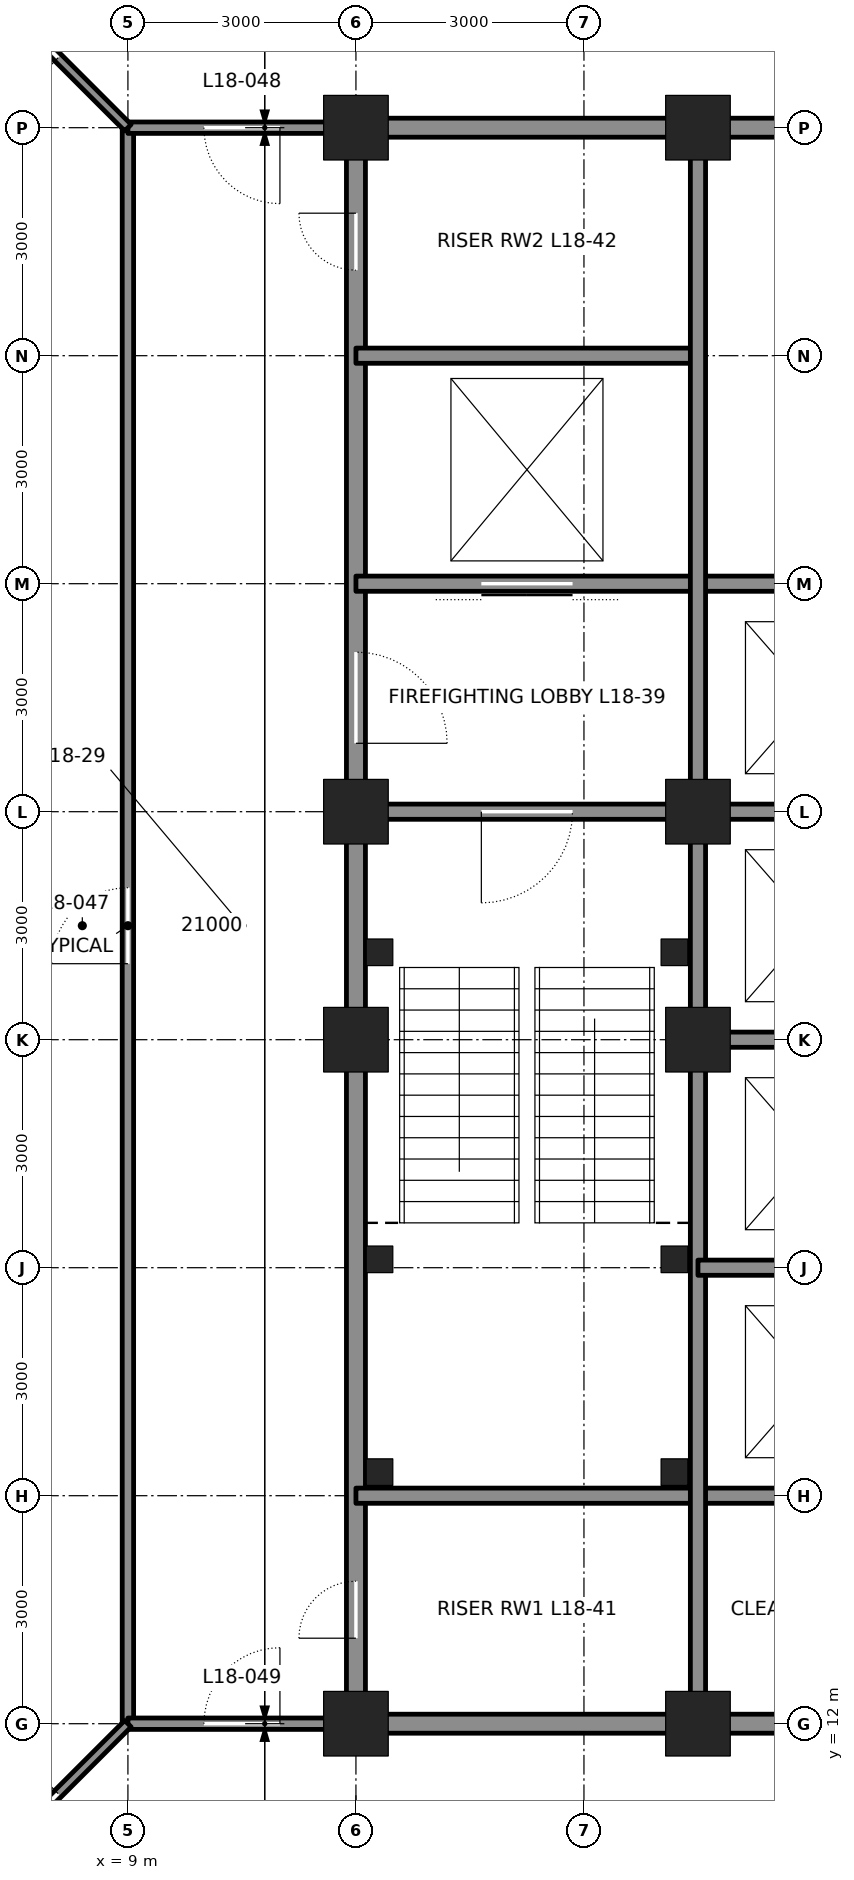
"""IFC4 building model, lengths in metres.
Left out: names, types, materials, properties, quantities, classifications, styles, units other than length and angle.
Written with IfcOpenShell. Run it as: python <this file> out.ifc"""

import sys

from ifc_helpers import new_model, si_unit, direction, frame, frame_2d, origin, origin_2d, place, context, subcontext, project, spatial, rectangle, hollow_rectangle, extrude, element, fill, save


model = new_model("IFC4")
c1 = context("Model", 3, precision=1e-05, world=origin(), true_north=direction((0.0, 1.0)))
c2 = subcontext(c1, "Body", "Model", "MODEL_VIEW")
j1 = project(units=[si_unit("LENGTHUNIT", "METRE"), si_unit("PLANEANGLEUNIT", "RADIAN")], contexts=[c1])
p1 = place(None, origin())
s1 = spatial("IfcSite", under=j1, at=p1, CompositionType="ELEMENT")
p2 = place(p1, origin())
s2 = spatial("IfcBuilding", under=s1, at=p2, CompositionType="ELEMENT")
p3 = place(p2, frame((0.0, 0.0, 87.3)))
s3 = spatial("IfcBuildingStorey", under=s2, at=p3, CompositionType="ELEMENT", Elevation=87.3)
for number, where, z_axis, x_axis in (
    (1, (12.0, 12.0, 0.0), (0.0, 0.0, 1.0), (1.0, 0.0, 0.0)),
    (2, (16.5, 12.0, 0.0), (0.0, 0.0, 1.0), (1.0, 0.0, 0.0)),
    (3, (12.0, 33.0, 0.0), (0.0, 0.0, 1.0), (1.0, 0.0, 0.0)),
    (4, (16.5, 33.0, 0.0), (0.0, 0.0, 1.0), (1.0, 0.0, 0.0)),
    (5, (12.0, 21.0, 0.0), (0.0, 0.0, 1.0), (1.0, 0.0, 0.0)),
    (6, (12.0, 24.0, 0.0), (0.0, 0.0, 1.0), (1.0, 0.0, 0.0)),
    (7, (16.5, 21.0, 0.0), (0.0, 0.0, 1.0), (1.0, 0.0, 0.0)),
    (8, (16.5, 24.0, 0.0), (0.0, 0.0, 1.0), (1.0, 0.0, 0.0)),
):
    element("IfcColumn", number, at=place(p3, frame(where, z_axis=z_axis, x_axis=x_axis)), inside=s3, PredefinedType="COLUMN", context=c2, shape_type="SweptSolid", body=[
        extrude(hollow_rectangle(XDim=0.85, YDim=0.85, WallThickness=0.085, at=origin_2d()), origin(), (0.0, 0.0, 1.0), 4.5),
    ])
p4 = place(p3, frame((12.0, 12.25, 0.0), z_axis=(0.0, 0.0, 1.0), x_axis=(0.0, 1.0, 0.0)))
e9 = element("IfcWall", 9, at=p4, inside=s3, PredefinedType="SOLIDWALL", context=c2, shape_type="SweptSolid", body=[
    extrude(rectangle(XDim=8.5, YDim=0.25, at=frame_2d((4.25, 0.0))), origin(), (0.0, 0.0, 1.0), 3.113),
])
p5 = place(p4, frame((0.875, 0.0, 0.0)))
e10 = element("IfcOpeningElement", 10, at=p5, cuts=e9, PredefinedType="OPENING", context=c2, shape_type="SweptSolid", body=[
    extrude(rectangle(XDim=0.75, YDim=2.1, at=frame_2d((0.375, 1.05))), frame((0.0, 0.135, 0.0), z_axis=(0.0, -1.0, 0.0), x_axis=(1.0, 0.0, 0.0)), (0.0, 0.0, 1.0), 0.27),
])
p6 = place(p3, frame((12.0, 21.25, 0.0), z_axis=(0.0, 0.0, 1.0), x_axis=(0.0, 1.0, 0.0)))
e11 = element("IfcWall", 11, at=p6, inside=s3, PredefinedType="SOLIDWALL", context=c2, shape_type="SweptSolid", body=[
    extrude(rectangle(XDim=2.5, YDim=0.25, at=frame_2d((1.25, 0.0))), origin(), (0.0, 0.0, 1.0), 3.113),
])
p7 = place(p3, frame((12.0, 24.25, 0.0), z_axis=(0.0, 0.0, 1.0), x_axis=(0.0, 1.0, 0.0)))
e12 = element("IfcWall", 12, at=p7, inside=s3, PredefinedType="SOLIDWALL", context=c2, shape_type="SweptSolid", body=[
    extrude(rectangle(XDim=8.5, YDim=0.25, at=frame_2d((4.25, 0.0))), origin(), (0.0, 0.0, 1.0), 3.113),
])
p8 = place(p7, frame((0.65, 0.0, 0.0)))
e13 = element("IfcOpeningElement", 13, at=p8, cuts=e12, PredefinedType="OPENING", context=c2, shape_type="SweptSolid", body=[
    extrude(rectangle(XDim=1.2, YDim=2.1, at=frame_2d((0.6, 1.05))), frame((0.0, 0.135, 0.0), z_axis=(0.0, -1.0, 0.0), x_axis=(1.0, 0.0, 0.0)), (0.0, 0.0, 1.0), 0.27),
])
p9 = place(p7, frame((6.875, 0.0, 0.0)))
e14 = element("IfcOpeningElement", 14, at=p9, cuts=e12, PredefinedType="OPENING", context=c2, shape_type="SweptSolid", body=[
    extrude(rectangle(XDim=0.75, YDim=2.1, at=frame_2d((0.375, 1.05))), frame((0.0, 0.135, 0.0), z_axis=(0.0, -1.0, 0.0), x_axis=(1.0, 0.0, 0.0)), (0.0, 0.0, 1.0), 0.27),
])
p10 = place(p3, frame((12.25, 12.0, 0.0), z_axis=(0.0, 0.0, 1.0), x_axis=(1.0, 0.0, 0.0)))
e15 = element("IfcWall", 15, at=p10, inside=s3, PredefinedType="SOLIDWALL", context=c2, shape_type="SweptSolid", body=[
    extrude(rectangle(XDim=4.0, YDim=0.25, at=frame_2d((2.0, 0.0))), origin(), (0.0, 0.0, 1.0), 3.181),
])
p11 = place(p3, frame((16.75, 12.0, 0.0), z_axis=(0.0, 0.0, 1.0), x_axis=(1.0, 0.0, 0.0)))
e16 = element("IfcWall", 16, at=p11, inside=s3, PredefinedType="SOLIDWALL", context=c2, shape_type="SweptSolid", body=[
    extrude(rectangle(XDim=2.5, YDim=0.25, at=frame_2d((1.25, 0.0))), origin(), (0.0, 0.0, 1.0), 3.181),
])
p12 = place(p3, frame((12.0, 15.0, 0.0), z_axis=(0.0, 0.0, 1.0), x_axis=(1.0, 0.0, 0.0)))
e17 = element("IfcWall", 17, at=p12, inside=s3, PredefinedType="SOLIDWALL", context=c2, shape_type="SweptSolid", body=[
    extrude(rectangle(XDim=7.5, YDim=0.2, at=frame_2d((3.75, 0.0))), origin(), (0.0, 0.0, 1.0), 4.34),
])
p13 = place(p3, frame((12.25, 24.0, 0.0), z_axis=(0.0, 0.0, 1.0), x_axis=(1.0, 0.0, 0.0)))
e18 = element("IfcWall", 18, at=p13, inside=s3, PredefinedType="SOLIDWALL", context=c2, shape_type="SweptSolid", body=[
    extrude(rectangle(XDim=4.0, YDim=0.2, at=frame_2d((2.0, 0.0))), origin(), (0.0, 0.0, 1.0), 3.39),
])
p14 = place(p13, frame((1.4, 0.0, 0.0)))
e19 = element("IfcOpeningElement", 19, at=p14, cuts=e18, PredefinedType="OPENING", context=c2, shape_type="SweptSolid", body=[
    extrude(rectangle(XDim=1.2, YDim=2.1, at=frame_2d((0.6, 1.05))), frame((0.0, 0.11, 0.0), z_axis=(0.0, -1.0, 0.0), x_axis=(1.0, 0.0, 0.0)), (0.0, 0.0, 1.0), 0.22),
])
p15 = place(p3, frame((16.75, 24.0, 0.0), z_axis=(0.0, 0.0, 1.0), x_axis=(1.0, 0.0, 0.0)))
e20 = element("IfcWall", 20, at=p15, inside=s3, PredefinedType="SOLIDWALL", context=c2, shape_type="SweptSolid", body=[
    extrude(rectangle(XDim=2.75, YDim=0.2, at=frame_2d((1.375, 0.0))), origin(), (0.0, 0.0, 1.0), 3.39),
])
p16 = place(p3, frame((12.0, 27.0, 0.0), z_axis=(0.0, 0.0, 1.0), x_axis=(1.0, 0.0, 0.0)))
e21 = element("IfcWall", 21, at=p16, inside=s3, PredefinedType="SOLIDWALL", context=c2, shape_type="SweptSolid", body=[
    extrude(rectangle(XDim=7.5, YDim=0.2, at=frame_2d((3.75, 0.0))), origin(), (0.0, 0.0, 1.0), 4.34),
])
p17 = place(p16, frame((1.65, 0.0, 0.0)))
e22 = element("IfcOpeningElement", 22, at=p17, cuts=e21, PredefinedType="OPENING", context=c2, shape_type="SweptSolid", body=[
    extrude(rectangle(XDim=1.2, YDim=2.1, at=frame_2d((0.6, 1.05))), frame((0.0, 0.11, 0.0), z_axis=(0.0, -1.0, 0.0), x_axis=(1.0, 0.0, 0.0)), (0.0, 0.0, 1.0), 0.22),
])
p18 = place(p3, frame((12.0, 30.0, 0.0), z_axis=(0.0, 0.0, 1.0), x_axis=(1.0, 0.0, 0.0)))
e23 = element("IfcWall", 23, at=p18, inside=s3, PredefinedType="SOLIDWALL", context=c2, shape_type="SweptSolid", body=[
    extrude(rectangle(XDim=4.5, YDim=0.2, at=frame_2d((2.25, 0.0))), origin(), (0.0, 0.0, 1.0), 4.34),
])
p19 = place(p3, frame((12.25, 33.0, 0.0), z_axis=(0.0, 0.0, 1.0), x_axis=(1.0, 0.0, 0.0)))
e24 = element("IfcWall", 24, at=p19, inside=s3, PredefinedType="SOLIDWALL", context=c2, shape_type="SweptSolid", body=[
    extrude(rectangle(XDim=4.0, YDim=0.25, at=frame_2d((2.0, 0.0))), origin(), (0.0, 0.0, 1.0), 3.181),
])
p20 = place(p3, frame((16.75, 33.0, 0.0), z_axis=(0.0, 0.0, 1.0), x_axis=(1.0, 0.0, 0.0)))
e25 = element("IfcWall", 25, at=p20, inside=s3, PredefinedType="SOLIDWALL", context=c2, shape_type="SweptSolid", body=[
    extrude(rectangle(XDim=2.5, YDim=0.25, at=frame_2d((1.25, 0.0))), origin(), (0.0, 0.0, 1.0), 3.181),
])
p21 = place(p3, frame((16.5, 12.25, 0.0), z_axis=(0.0, 0.0, 1.0), x_axis=(0.0, 1.0, 0.0)))
e26 = element("IfcWall", 26, at=p21, inside=s3, PredefinedType="SOLIDWALL", context=c2, shape_type="SweptSolid", body=[
    extrude(rectangle(XDim=8.5, YDim=0.2, at=frame_2d((4.25, 0.0))), origin(), (0.0, 0.0, 1.0), 3.413),
])
p22 = place(p3, frame((16.5, 21.25, 0.0), z_axis=(0.0, 0.0, 1.0), x_axis=(0.0, 1.0, 0.0)))
e27 = element("IfcWall", 27, at=p22, inside=s3, PredefinedType="SOLIDWALL", context=c2, shape_type="SweptSolid", body=[
    extrude(rectangle(XDim=2.5, YDim=0.2, at=frame_2d((1.25, 0.0))), origin(), (0.0, 0.0, 1.0), 3.413),
])
p23 = place(p3, frame((16.5, 24.25, 0.0), z_axis=(0.0, 0.0, 1.0), x_axis=(0.0, 1.0, 0.0)))
e28 = element("IfcWall", 28, at=p23, inside=s3, PredefinedType="SOLIDWALL", context=c2, shape_type="SweptSolid", body=[
    extrude(rectangle(XDim=8.5, YDim=0.2, at=frame_2d((4.25, 0.0))), origin(), (0.0, 0.0, 1.0), 3.413),
])
p24 = place(p3, frame((16.5, 18.0, 0.0), z_axis=(0.0, 0.0, 1.0), x_axis=(1.0, 0.0, 0.0)))
e29 = element("IfcWall", 29, at=p24, inside=s3, PredefinedType="SOLIDWALL", context=c2, shape_type="SweptSolid", body=[
    extrude(rectangle(XDim=3.0, YDim=0.2, at=frame_2d((1.5, 0.0))), origin(), (0.0, 0.0, 1.0), 4.34),
])
p25 = place(p3, frame((16.75, 21.0, 0.0), z_axis=(0.0, 0.0, 1.0), x_axis=(1.0, 0.0, 0.0)))
e30 = element("IfcWall", 30, at=p25, inside=s3, PredefinedType="SOLIDWALL", context=c2, shape_type="SweptSolid", body=[
    extrude(rectangle(XDim=2.75, YDim=0.2, at=frame_2d((1.375, 0.0))), origin(), (0.0, 0.0, 1.0), 3.39),
])
p26 = place(p3, frame((9.0, 12.0, -0.3), z_axis=(0.0, 0.0, 1.0), x_axis=(0.0, 1.0, 0.0)))
e31 = element("IfcWall", 31, at=p26, inside=s3, PredefinedType="PARTITIONING", context=c2, shape_type="SweptSolid", body=[
    extrude(rectangle(XDim=21.0, YDim=0.15, at=frame_2d((10.5, 0.0))), origin(), (0.0, 0.0, 1.0), 4.34),
])
p27 = place(p26, frame((10.0, 0.0, 0.3)))
e32 = element("IfcOpeningElement", 32, at=p27, cuts=e31, PredefinedType="OPENING", context=c2, shape_type="SweptSolid", body=[
    extrude(rectangle(XDim=1.0, YDim=2.4, at=frame_2d((0.5, 1.2))), frame((0.0, 0.085, 0.0), z_axis=(0.0, -1.0, 0.0), x_axis=(1.0, 0.0, 0.0)), (0.0, 0.0, 1.0), 0.17),
])
p28 = place(p3, frame((9.0, 33.0, -0.3), z_axis=(0.0, 0.0, 1.0), x_axis=(1.0, 0.0, 0.0)))
e33 = element("IfcWall", 33, at=p28, inside=s3, PredefinedType="PARTITIONING", context=c2, shape_type="SweptSolid", body=[
    extrude(rectangle(XDim=3.0, YDim=0.15, at=frame_2d((1.5, 0.0))), origin(), (0.0, 0.0, 1.0), 3.481),
])
p29 = place(p28, frame((1.0, 0.0, 0.3)))
e34 = element("IfcOpeningElement", 34, at=p29, cuts=e33, PredefinedType="OPENING", context=c2, shape_type="SweptSolid", body=[
    extrude(rectangle(XDim=1.0, YDim=2.4, at=frame_2d((0.5, 1.2))), frame((0.0, 0.085, 0.0), z_axis=(0.0, -1.0, 0.0), x_axis=(1.0, 0.0, 0.0)), (0.0, 0.0, 1.0), 0.17),
])
p30 = place(p3, frame((9.0, 12.0, -0.3), z_axis=(0.0, 0.0, 1.0), x_axis=(1.0, 0.0, 0.0)))
e35 = element("IfcWall", 35, at=p30, inside=s3, PredefinedType="PARTITIONING", context=c2, shape_type="SweptSolid", body=[
    extrude(rectangle(XDim=3.0, YDim=0.15, at=frame_2d((1.5, 0.0))), origin(), (0.0, 0.0, 1.0), 3.481),
])
p31 = place(p30, frame((1.0, 0.0, 0.3)))
e36 = element("IfcOpeningElement", 36, at=p31, cuts=e35, PredefinedType="OPENING", context=c2, shape_type="SweptSolid", body=[
    extrude(rectangle(XDim=1.0, YDim=2.4, at=frame_2d((0.5, 1.2))), frame((0.0, 0.085, 0.0), z_axis=(0.0, -1.0, 0.0), x_axis=(1.0, 0.0, 0.0)), (0.0, 0.0, 1.0), 0.17),
])
p32 = place(p3, frame((9.0, 33.0, -0.3), z_axis=(0.0, 0.0, 1.0), x_axis=(-0.707106781187, 0.707106781187, 0.0)))
e37 = element("IfcWall", 37, at=p32, inside=s3, PredefinedType="PARTITIONING", context=c2, shape_type="SweptSolid", body=[
    extrude(rectangle(XDim=11.842, YDim=0.12, at=frame_2d((5.921, 0.0))), origin(), (0.0, 0.0, 1.0), 4.34),
])
p33 = place(p32, frame((1.3, 0.0, 0.3)))
e38 = element("IfcOpeningElement", 38, at=p33, cuts=e37, PredefinedType="OPENING", context=c2, shape_type="SweptSolid", body=[
    extrude(rectangle(XDim=1.0, YDim=2.4, at=frame_2d((0.5, 1.2))), frame((0.0, 0.07, 0.0), z_axis=(0.0, -1.0, 0.0), x_axis=(1.0, 0.0, 0.0)), (0.0, 0.0, 1.0), 0.14),
])
p34 = place(p3, frame((9.0, 12.0, -0.3), z_axis=(0.0, 0.0, 1.0), x_axis=(-0.707106781187, -0.707106781187, 0.0)))
e39 = element("IfcWall", 39, at=p34, inside=s3, PredefinedType="PARTITIONING", context=c2, shape_type="SweptSolid", body=[
    extrude(rectangle(XDim=11.842, YDim=0.12, at=frame_2d((5.921, 0.0))), origin(), (0.0, 0.0, 1.0), 4.34),
])
p35 = place(p34, frame((1.3, 0.0, 0.3)))
e40 = element("IfcOpeningElement", 40, at=p35, cuts=e39, PredefinedType="OPENING", context=c2, shape_type="SweptSolid", body=[
    extrude(rectangle(XDim=1.0, YDim=2.4, at=frame_2d((0.5, 1.2))), frame((0.0, 0.07, 0.0), z_axis=(0.0, -1.0, 0.0), x_axis=(1.0, 0.0, 0.0)), (0.0, 0.0, 1.0), 0.14),
])
for number, where, z_axis, x_axis in (
    (41, (12.31, 15.31, 0.0), (0.0, 0.0, 1.0), (1.0, 0.0, 0.0)),
    (42, (16.19, 15.31, 0.0), (0.0, 0.0, 1.0), (1.0, 0.0, 0.0)),
    (43, (12.31, 18.11, 0.0), (0.0, 0.0, 1.0), (1.0, 0.0, 0.0)),
    (44, (16.19, 18.11, 0.0), (0.0, 0.0, 1.0), (1.0, 0.0, 0.0)),
    (45, (12.31, 22.15, 0.0), (0.0, 0.0, 1.0), (1.0, 0.0, 0.0)),
    (46, (16.19, 22.15, 0.0), (0.0, 0.0, 1.0), (1.0, 0.0, 0.0)),
):
    element("IfcColumn", number, at=place(p3, frame(where, z_axis=z_axis, x_axis=x_axis)), inside=s3, PredefinedType="COLUMN", context=c2, shape_type="SweptSolid", body=[
        extrude(hollow_rectangle(XDim=0.35, YDim=0.35, WallThickness=0.035, at=origin_2d()), origin(), (0.0, 0.0, 1.0), 4.5),
    ])
p36 = place(p14, frame((1.2, 0.0, 0.0), z_axis=(0.0, 0.0, 1.0), x_axis=(-1.0, 0.0, 0.0)))
e47 = element("IfcDoor", 47, at=p36, inside=s3, OperationType="SINGLE_SWING_RIGHT", PredefinedType="DOOR", context=c2, shape_type="SweptSolid", body=[
    extrude(rectangle(XDim=1.2, YDim=2.1, at=frame_2d((0.6, 1.05))), frame((0.0, 0.025, 0.0), z_axis=(0.0, -1.0, 0.0), x_axis=(1.0, 0.0, 0.0)), (0.0, 0.0, 1.0), 0.05),
])
fill(e19, e47)
p37 = place(p8, frame((1.2, 0.0, 0.0), z_axis=(0.0, 0.0, 1.0), x_axis=(-1.0, 0.0, 0.0)))
e48 = element("IfcDoor", 48, at=p37, inside=s3, OperationType="SINGLE_SWING_RIGHT", PredefinedType="DOOR", context=c2, shape_type="SweptSolid", body=[
    extrude(rectangle(XDim=1.2, YDim=2.1, at=frame_2d((0.6, 1.05))), frame((0.0, 0.025, 0.0), z_axis=(0.0, -1.0, 0.0), x_axis=(1.0, 0.0, 0.0)), (0.0, 0.0, 1.0), 0.05),
])
fill(e13, e48)
p38 = place(p17, origin())
e49 = element("IfcDoor", 49, at=p38, inside=s3, OperationType="DOUBLE_DOOR_SLIDING", PredefinedType="DOOR", context=c2, shape_type="SweptSolid", body=[
    extrude(rectangle(XDim=1.2, YDim=2.1, at=frame_2d((0.6, 1.05))), frame((0.0, 0.025, 0.0), z_axis=(0.0, -1.0, 0.0), x_axis=(1.0, 0.0, 0.0)), (0.0, 0.0, 1.0), 0.05),
])
fill(e22, e49)
p39 = place(p5, origin())
e50 = element("IfcDoor", 50, at=p39, inside=s3, OperationType="SINGLE_SWING_LEFT", PredefinedType="DOOR", context=c2, shape_type="SweptSolid", body=[
    extrude(rectangle(XDim=0.75, YDim=2.1, at=frame_2d((0.375, 1.05))), frame((0.0, 0.025, 0.0), z_axis=(0.0, -1.0, 0.0), x_axis=(1.0, 0.0, 0.0)), (0.0, 0.0, 1.0), 0.05),
])
fill(e10, e50)
p40 = place(p9, origin())
e51 = element("IfcDoor", 51, at=p40, inside=s3, OperationType="SINGLE_SWING_RIGHT", PredefinedType="DOOR", context=c2, shape_type="SweptSolid", body=[
    extrude(rectangle(XDim=0.75, YDim=2.1, at=frame_2d((0.375, 1.05))), frame((0.0, 0.025, 0.0), z_axis=(0.0, -1.0, 0.0), x_axis=(1.0, 0.0, 0.0)), (0.0, 0.0, 1.0), 0.05),
])
fill(e14, e51)
p41 = place(p27, origin())
e52 = element("IfcDoor", 52, at=p41, inside=s3, OperationType="SINGLE_SWING_LEFT", PredefinedType="DOOR", context=c2, shape_type="SweptSolid", body=[
    extrude(rectangle(XDim=1.0, YDim=2.4, at=frame_2d((0.5, 1.2))), frame((0.0, 0.025, 0.0), z_axis=(0.0, -1.0, 0.0), x_axis=(1.0, 0.0, 0.0)), (0.0, 0.0, 1.0), 0.05),
])
fill(e32, e52)
p42 = place(p29, frame((1.0, 0.0, 0.0), z_axis=(0.0, 0.0, 1.0), x_axis=(-1.0, 0.0, 0.0)))
e53 = element("IfcDoor", 53, at=p42, inside=s3, OperationType="SINGLE_SWING_LEFT", PredefinedType="DOOR", context=c2, shape_type="SweptSolid", body=[
    extrude(rectangle(XDim=1.0, YDim=2.4, at=frame_2d((0.5, 1.2))), frame((0.0, 0.025, 0.0), z_axis=(0.0, -1.0, 0.0), x_axis=(1.0, 0.0, 0.0)), (0.0, 0.0, 1.0), 0.05),
])
fill(e34, e53)
p43 = place(p31, origin())
e54 = element("IfcDoor", 54, at=p43, inside=s3, OperationType="SINGLE_SWING_RIGHT", PredefinedType="DOOR", context=c2, shape_type="SweptSolid", body=[
    extrude(rectangle(XDim=1.0, YDim=2.4, at=frame_2d((0.5, 1.2))), frame((0.0, 0.025, 0.0), z_axis=(0.0, -1.0, 0.0), x_axis=(1.0, 0.0, 0.0)), (0.0, 0.0, 1.0), 0.05),
])
fill(e36, e54)
p44 = place(p33, origin())
e55 = element("IfcDoor", 55, at=p44, inside=s3, OperationType="SINGLE_SWING_LEFT", PredefinedType="DOOR", context=c2, shape_type="SweptSolid", body=[
    extrude(rectangle(XDim=1.0, YDim=2.4, at=frame_2d((0.5, 1.2))), frame((0.0, 0.025, 0.0), z_axis=(0.0, -1.0, 0.0), x_axis=(1.0, 0.0, 0.0)), (0.0, 0.0, 1.0), 0.05),
])
fill(e38, e55)
p45 = place(p35, frame((1.0, 0.0, 0.0), z_axis=(0.0, 0.0, 1.0), x_axis=(-1.0, 0.0, 0.0)))
e56 = element("IfcDoor", 56, at=p45, inside=s3, OperationType="SINGLE_SWING_RIGHT", PredefinedType="DOOR", context=c2, shape_type="SweptSolid", body=[
    extrude(rectangle(XDim=1.0, YDim=2.4, at=frame_2d((0.5, 1.2))), frame((0.0, 0.025, 0.0), z_axis=(0.0, -1.0, 0.0), x_axis=(1.0, 0.0, 0.0)), (0.0, 0.0, 1.0), 0.05),
])
fill(e40, e56)
save(model, sys.argv[1])
